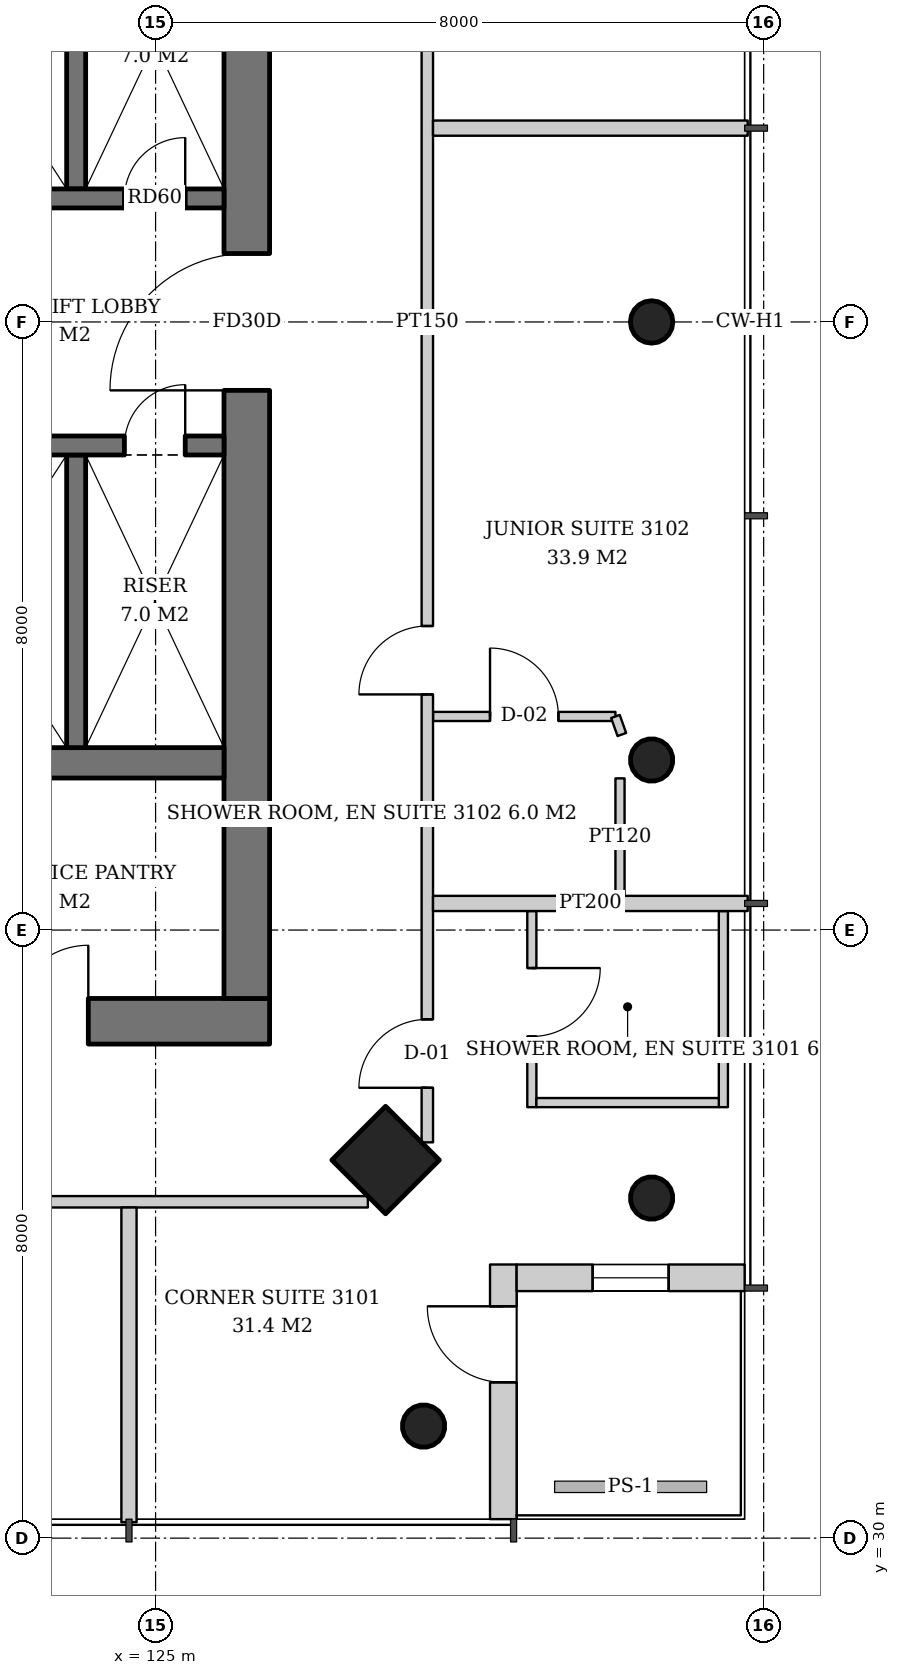
"""IFC4 building model, lengths in metres.
Left out: names, types, materials, properties, quantities, classifications, styles, units other than length and angle.
Written with IfcOpenShell. Run it as: python <this file> out.ifc"""

import sys

from ifc_helpers import new_model, si_unit, direction, frame, frame_2d, origin, origin_2d, place, context, subcontext, project, spatial, rectangle, hollow_circle, extrude, element, fill, save


model = new_model("IFC4")
c1 = context("Model", 3, precision=1e-05, world=origin(), true_north=direction((0.0, 1.0)))
c2 = subcontext(c1, "Body", "Model", "MODEL_VIEW")
j1 = project(units=[si_unit("LENGTHUNIT", "METRE"), si_unit("PLANEANGLEUNIT", "RADIAN")], contexts=[c1])
p1 = place(None, origin())
s1 = spatial("IfcSite", under=j1, at=p1, CompositionType="ELEMENT")
p2 = place(p1, origin())
s2 = spatial("IfcBuilding", under=s1, at=p2, CompositionType="ELEMENT")
p3 = place(p2, frame((0.0, 0.0, 123.6)))
s3 = spatial("IfcBuildingStorey", under=s2, at=p3, CompositionType="ELEMENT", Elevation=123.6)
p4 = place(p3, frame((131.578, 34.422, 0.0), z_axis=(-0.043032401563, 0.043032401563, 0.998146494675), x_axis=(-0.707106781187, -0.707106781187, 0.0)))
e1 = element("IfcColumn", 1, at=p4, inside=s3, PredefinedType="COLUMN", context=c2, shape_type="SweptSolid", body=[
    extrude(hollow_circle(Radius=0.28, WallThickness=0.02, at=origin_2d()), origin(), (0.0, 0.0, 1.0), 3.807),
])
p5 = place(p3, frame((131.578, 40.211, 0.0), z_axis=(-0.043062285527, 0.021563230905, 0.998839660125), x_axis=(-0.44774654769, -0.894160516368, 0.0)))
e2 = element("IfcColumn", 2, at=p5, inside=s3, PredefinedType="COLUMN", context=c2, shape_type="SweptSolid", body=[
    extrude(hollow_circle(Radius=0.28, WallThickness=0.02, at=origin_2d()), origin(), (0.0, 0.0, 1.0), 3.804),
])
p6 = place(p3, frame((131.578, 46.0, 0.0), z_axis=(-0.043072300418, 0.0, 0.999071957837), x_axis=(0.0, -1.0, 0.0)))
e3 = element("IfcColumn", 3, at=p6, inside=s3, PredefinedType="COLUMN", context=c2, shape_type="SweptSolid", body=[
    extrude(hollow_circle(Radius=0.28, WallThickness=0.02, at=origin_2d()), origin(), (0.0, 0.0, 1.0), 3.803),
])
p7 = place(p3, frame((128.078, 34.922, 0.0), z_axis=(-0.043032401563, 0.043032401563, 0.998146494675), x_axis=(-0.707106781187, -0.707106781187, 0.0)))
e4 = element("IfcColumn", 4, at=p7, inside=s3, PredefinedType="COLUMN", context=c2, shape_type="SweptSolid", body=[
    extrude(rectangle(XDim=1.0, YDim=1.0, at=origin_2d()), origin(), (0.0, 0.0, 1.0), 3.807),
])
p8 = place(p3, frame((128.578, 31.422, 0.0), z_axis=(-0.043032401563, 0.043032401563, 0.998146494675), x_axis=(-0.707106781187, -0.707106781187, 0.0)))
e5 = element("IfcColumn", 5, at=p8, inside=s3, PredefinedType="COLUMN", context=c2, shape_type="SweptSolid", body=[
    extrude(hollow_circle(Radius=0.28, WallThickness=0.02, at=origin_2d()), origin(), (0.0, 0.0, 1.0), 3.807),
])
p9 = place(p3, frame((107.5, 36.8, 0.0), z_axis=(0.0, 0.0, 1.0), x_axis=(1.0, 0.0, 0.0)))
e6 = element("IfcWall", 6, at=p9, inside=s3, PredefinedType="SHEAR", context=c2, shape_type="SweptSolid", body=[
    extrude(rectangle(XDim=19.0, YDim=0.6, at=frame_2d((9.5, 0.0))), origin(), (0.0, 0.0, 1.0), 3.8),
])
p10 = place(p9, frame((3.9, 0.0, 0.0)))
e7 = element("IfcOpeningElement", 7, at=p10, cuts=e6, PredefinedType="OPENING", context=c2, shape_type="SweptSolid", body=[
    extrude(rectangle(XDim=1.0, YDim=2.1, at=frame_2d((0.5, 1.05))), frame((0.0, 0.31, 0.0), z_axis=(0.0, -1.0, 0.0), x_axis=(1.0, 0.0, 0.0)), (0.0, 0.0, 1.0), 0.62),
])
p11 = place(p9, frame((15.615, 0.0, 0.0)))
e8 = element("IfcOpeningElement", 8, at=p11, cuts=e6, PredefinedType="OPENING", context=c2, shape_type="SweptSolid", body=[
    extrude(rectangle(XDim=1.0, YDim=2.1, at=frame_2d((0.5, 1.05))), frame((0.0, 0.31, 0.0), z_axis=(0.0, -1.0, 0.0), x_axis=(1.0, 0.0, 0.0)), (0.0, 0.0, 1.0), 0.62),
])
p12 = place(p3, frame((126.2, 37.1, 0.0), z_axis=(0.0, 0.0, 1.0), x_axis=(0.0, 1.0, 0.0)))
e9 = element("IfcWall", 9, at=p12, inside=s3, PredefinedType="SHEAR", context=c2, shape_type="SweptSolid", body=[
    extrude(rectangle(XDim=17.8, YDim=0.6, at=frame_2d((8.9, 0.0))), origin(), (0.0, 0.0, 1.0), 3.8),
])
p13 = place(p12, frame((8.0, 0.0, 0.0)))
e10 = element("IfcOpeningElement", 10, at=p13, cuts=e9, PredefinedType="OPENING", context=c2, shape_type="SweptSolid", body=[
    extrude(rectangle(XDim=1.8, YDim=2.4, at=frame_2d((0.9, 1.2))), frame((0.0, 0.31, 0.0), z_axis=(0.0, -1.0, 0.0), x_axis=(1.0, 0.0, 0.0)), (0.0, 0.0, 1.0), 0.62),
])
p14 = place(p3, frame((108.1, 40.2, 0.0), z_axis=(0.0, 0.0, 1.0), x_axis=(1.0, 0.0, 0.0)))
e11 = element("IfcWall", 11, at=p14, inside=s3, PredefinedType="SHEAR", context=c2, shape_type="SweptSolid", body=[
    extrude(rectangle(XDim=17.8, YDim=0.4, at=frame_2d((8.9, 0.0))), origin(), (0.0, 0.0, 1.0), 3.8),
])
p15 = place(p3, frame((129.575, 30.25, 0.0), z_axis=(0.0, 0.0, 1.0), x_axis=(0.0, 1.0, 0.0)))
e12 = element("IfcWall", 12, at=p15, inside=s3, PredefinedType="SOLIDWALL", context=c2, shape_type="SweptSolid", body=[
    extrude(rectangle(XDim=3.35, YDim=0.35, at=frame_2d((1.675, 0.0))), origin(), (0.0, 0.0, 1.0), 3.6),
])
p16 = place(p15, frame((1.8, 0.0, 0.0)))
e13 = element("IfcOpeningElement", 13, at=p16, cuts=e12, PredefinedType="OPENING", context=c2, shape_type="SweptSolid", body=[
    extrude(rectangle(XDim=1.0, YDim=2.4, at=frame_2d((0.5, 1.2))), frame((0.0, 0.185, 0.0), z_axis=(0.0, -1.0, 0.0), x_axis=(1.0, 0.0, 0.0)), (0.0, 0.0, 1.0), 0.37),
])
p17 = place(p3, frame((129.75, 33.425, 0.0), z_axis=(0.0, 0.0, 1.0), x_axis=(1.0, 0.0, 0.0)))
e14 = element("IfcWall", 14, at=p17, inside=s3, PredefinedType="SOLIDWALL", context=c2, shape_type="SweptSolid", body=[
    extrude(rectangle(XDim=3.0, YDim=0.35, at=frame_2d((1.5, 0.0))), origin(), (0.0, 0.0, 1.0), 3.6),
])
p18 = place(p17, frame((1.0, 0.0, 0.9)))
e15 = element("IfcOpeningElement", 15, at=p18, cuts=e14, PredefinedType="OPENING", context=c2, shape_type="SweptSolid", body=[
    extrude(rectangle(XDim=1.0, YDim=2.4, at=frame_2d((0.5, 1.2))), frame((0.0, 0.185, 0.0), z_axis=(0.0, -1.0, 0.0), x_axis=(1.0, 0.0, 0.0)), (0.0, 0.0, 1.0), 0.37),
])
p19 = place(p3, frame((123.955, 47.75, 0.0), z_axis=(0.0, 0.0, 1.0), x_axis=(0.0, 1.0, 0.0)))
e16 = element("IfcWall", 16, at=p19, inside=s3, PredefinedType="SHEAR", context=c2, shape_type="SweptSolid", body=[
    extrude(rectangle(XDim=3.85, YDim=0.25, at=frame_2d((1.925, 0.0))), origin(), (0.0, 0.0, 1.0), 3.8),
])
p20 = place(p3, frame((121.33, 47.625, 0.0), z_axis=(0.0, 0.0, 1.0), x_axis=(1.0, 0.0, 0.0)))
e17 = element("IfcWall", 17, at=p20, inside=s3, PredefinedType="SHEAR", context=c2, shape_type="SweptSolid", body=[
    extrude(rectangle(XDim=4.57, YDim=0.25, at=frame_2d((2.285, 0.0))), origin(), (0.0, 0.0, 1.0), 3.8),
])
p21 = place(p20, frame((0.55, 0.0, 0.0)))
e18 = element("IfcOpeningElement", 18, at=p21, cuts=e17, PredefinedType="OPENING", context=c2, shape_type="SweptSolid", body=[
    extrude(rectangle(XDim=1.4, YDim=2.4, at=frame_2d((0.7, 1.2))), frame((0.0, 0.135, 0.0), z_axis=(0.0, -1.0, 0.0), x_axis=(1.0, 0.0, 0.0)), (0.0, 0.0, 1.0), 0.27),
])
p22 = place(p20, frame((3.26, 0.0, 0.0)))
e19 = element("IfcOpeningElement", 19, at=p22, cuts=e17, PredefinedType="OPENING", context=c2, shape_type="SweptSolid", body=[
    extrude(rectangle(XDim=0.8, YDim=2.0, at=frame_2d((0.4, 1.0))), frame((0.0, 0.135, 0.0), z_axis=(0.0, -1.0, 0.0), x_axis=(1.0, 0.0, 0.0)), (0.0, 0.0, 1.0), 0.27),
])
p23 = place(p3, frame((123.955, 44.25, 0.0), z_axis=(0.0, 0.0, 1.0), x_axis=(0.0, -1.0, 0.0)))
e20 = element("IfcWall", 20, at=p23, inside=s3, PredefinedType="SHEAR", context=c2, shape_type="SweptSolid", body=[
    extrude(rectangle(XDim=3.85, YDim=0.25, at=frame_2d((1.925, 0.0))), origin(), (0.0, 0.0, 1.0), 3.8),
])
p24 = place(p3, frame((121.33, 44.375, 0.0), z_axis=(0.0, 0.0, 1.0), x_axis=(1.0, 0.0, 0.0)))
e21 = element("IfcWall", 21, at=p24, inside=s3, PredefinedType="SHEAR", context=c2, shape_type="SweptSolid", body=[
    extrude(rectangle(XDim=4.57, YDim=0.25, at=frame_2d((2.285, 0.0))), origin(), (0.0, 0.0, 1.0), 3.8),
])
p25 = place(p24, frame((0.55, 0.0, 0.0)))
e22 = element("IfcOpeningElement", 22, at=p25, cuts=e21, PredefinedType="OPENING", context=c2, shape_type="SweptSolid", body=[
    extrude(rectangle(XDim=1.4, YDim=2.4, at=frame_2d((0.7, 1.2))), frame((0.0, 0.135, 0.0), z_axis=(0.0, -1.0, 0.0), x_axis=(1.0, 0.0, 0.0)), (0.0, 0.0, 1.0), 0.27),
])
p26 = place(p24, frame((3.26, 0.0, 0.0)))
e23 = element("IfcOpeningElement", 23, at=p26, cuts=e21, PredefinedType="OPENING", context=c2, shape_type="SweptSolid", body=[
    extrude(rectangle(XDim=0.8, YDim=2.0, at=frame_2d((0.4, 1.0))), frame((0.0, 0.135, 0.0), z_axis=(0.0, -1.0, 0.0), x_axis=(1.0, 0.0, 0.0)), (0.0, 0.0, 1.0), 0.27),
])
p27 = place(p3, frame((129.95, 38.25, 0.0), z_axis=(0.0, 0.0, 1.0), x_axis=(0.0, -1.0, 0.0)))
e24 = element("IfcWall", 24, at=p27, inside=s3, PredefinedType="PARTITIONING", context=c2, shape_type="SweptSolid", body=[
    extrude(rectangle(XDim=2.58, YDim=0.12, at=frame_2d((1.29, 0.0))), origin(), (0.0, 0.0, 1.0), 2.9),
])
p28 = place(p27, frame((0.75, 0.0, 0.0)))
e25 = element("IfcOpeningElement", 25, at=p28, cuts=e24, PredefinedType="OPENING", context=c2, shape_type="SweptSolid", body=[
    extrude(rectangle(XDim=0.9, YDim=2.1, at=frame_2d((0.45, 1.05))), frame((0.0, 0.07, 0.0), z_axis=(0.0, -1.0, 0.0), x_axis=(1.0, 0.0, 0.0)), (0.0, 0.0, 1.0), 0.14),
])
p29 = place(p3, frame((132.47, 38.25, 0.0), z_axis=(0.0, 0.0, 1.0), x_axis=(0.0, -1.0, 0.0)))
e26 = element("IfcWall", 26, at=p29, inside=s3, PredefinedType="PARTITIONING", context=c2, shape_type="SweptSolid", body=[
    extrude(rectangle(XDim=2.58, YDim=0.12, at=frame_2d((1.29, 0.0))), origin(), (0.0, 0.0, 1.0), 3.6),
])
p30 = place(p3, frame((130.01, 35.73, 0.0), z_axis=(0.0, 0.0, 1.0), x_axis=(1.0, 0.0, 0.0)))
e27 = element("IfcWall", 27, at=p30, inside=s3, PredefinedType="PARTITIONING", context=c2, shape_type="SweptSolid", body=[
    extrude(rectangle(XDim=2.4, YDim=0.12, at=frame_2d((1.2, 0.0))), origin(), (0.0, 0.0, 1.0), 3.2),
])
p31 = place(p3, frame((131.11, 38.45, 0.0), z_axis=(0.0, 0.0, 1.0), x_axis=(0.0, 1.0, 0.0)))
e28 = element("IfcWall", 28, at=p31, inside=s3, PredefinedType="PARTITIONING", context=c2, shape_type="SweptSolid", body=[
    extrude(rectangle(XDim=1.546, YDim=0.12, at=frame_2d((0.773, 0.0))), origin(), (0.0, 0.0, 1.0), 3.6),
])
p32 = place(p3, frame((128.65, 40.81, 0.0), z_axis=(0.0, 0.0, 1.0), x_axis=(1.0, 0.0, 0.0)))
e29 = element("IfcWall", 29, at=p32, inside=s3, PredefinedType="PARTITIONING", context=c2, shape_type="SweptSolid", body=[
    extrude(rectangle(XDim=2.4, YDim=0.12, at=frame_2d((1.2, 0.0))), origin(), (0.0, 0.0, 1.0), 3.0),
])
p33 = place(p32, frame((0.75, 0.0, 0.0)))
e30 = element("IfcOpeningElement", 30, at=p33, cuts=e29, PredefinedType="OPENING", context=c2, shape_type="SweptSolid", body=[
    extrude(rectangle(XDim=0.9, YDim=2.1, at=frame_2d((0.45, 1.05))), frame((0.0, 0.07, 0.0), z_axis=(0.0, -1.0, 0.0), x_axis=(1.0, 0.0, 0.0)), (0.0, 0.0, 1.0), 0.14),
])
p34 = place(p3, frame((128.575, 35.207, 0.0), z_axis=(0.0, 0.0, 1.0), x_axis=(0.0, 1.0, 0.0)))
e31 = element("IfcWall", 31, at=p34, inside=s3, PredefinedType="PARTITIONING", context=c2, shape_type="SweptSolid", body=[
    extrude(rectangle(XDim=21.586, YDim=0.15, at=frame_2d((10.793, 0.0))), origin(), (0.0, 0.0, 1.0), 2.9),
])
p35 = place(p34, frame((0.718, 0.0, 0.0)))
e32 = element("IfcOpeningElement", 32, at=p35, cuts=e31, PredefinedType="OPENING", context=c2, shape_type="SweptSolid", body=[
    extrude(rectangle(XDim=0.9, YDim=2.1, at=frame_2d((0.45, 1.05))), frame((0.0, 0.085, 0.0), z_axis=(0.0, -1.0, 0.0), x_axis=(1.0, 0.0, 0.0)), (0.0, 0.0, 1.0), 0.17),
])
p36 = place(p34, frame((5.893, 0.0, 0.0)))
e33 = element("IfcOpeningElement", 33, at=p36, cuts=e31, PredefinedType="OPENING", context=c2, shape_type="SweptSolid", body=[
    extrude(rectangle(XDim=0.9, YDim=2.1, at=frame_2d((0.45, 1.05))), frame((0.0, 0.085, 0.0), z_axis=(0.0, -1.0, 0.0), x_axis=(1.0, 0.0, 0.0)), (0.0, 0.0, 1.0), 0.17),
])
p37 = place(p34, frame((16.043, 0.0, 0.0)))
e34 = element("IfcOpeningElement", 34, at=p37, cuts=e31, PredefinedType="OPENING", context=c2, shape_type="SweptSolid", body=[
    extrude(rectangle(XDim=1.0, YDim=2.1, at=frame_2d((0.5, 1.05))), frame((0.0, 0.085, 0.0), z_axis=(0.0, -1.0, 0.0), x_axis=(1.0, 0.0, 0.0)), (0.0, 0.0, 1.0), 0.17),
])
p38 = place(p3, frame((128.65, 38.35, 0.0), z_axis=(0.0, 0.0, 1.0), x_axis=(1.0, 0.0, 0.0)))
e35 = element("IfcWall", 35, at=p38, inside=s3, PredefinedType="PARTITIONING", context=c2, shape_type="SweptSolid", body=[
    extrude(rectangle(XDim=4.14, YDim=0.2, at=frame_2d((2.07, 0.0))), origin(), (0.0, 0.0, 1.0), 3.2),
])
p39 = place(p3, frame((128.65, 48.55, 0.0), z_axis=(0.0, 0.0, 1.0), x_axis=(1.0, 0.0, 0.0)))
e36 = element("IfcWall", 36, at=p39, inside=s3, PredefinedType="PARTITIONING", context=c2, shape_type="SweptSolid", body=[
    extrude(rectangle(XDim=4.14, YDim=0.2, at=frame_2d((2.07, 0.0))), origin(), (0.0, 0.0, 1.0), 3.0),
])
p40 = place(p3, frame((106.207, 34.425, 0.0), z_axis=(0.0, 0.0, 1.0), x_axis=(1.0, 0.0, 0.0)))
e37 = element("IfcWall", 37, at=p40, inside=s3, PredefinedType="PARTITIONING", context=c2, shape_type="SweptSolid", body=[
    extrude(rectangle(XDim=21.586, YDim=0.15, at=frame_2d((10.793, 0.0))), origin(), (0.0, 0.0, 1.0), 2.9),
])
p41 = place(p40, frame((0.718, 0.0, 0.0)))
e38 = element("IfcOpeningElement", 38, at=p41, cuts=e37, PredefinedType="OPENING", context=c2, shape_type="SweptSolid", body=[
    extrude(rectangle(XDim=0.9, YDim=2.1, at=frame_2d((0.45, 1.05))), frame((0.0, 0.085, 0.0), z_axis=(0.0, -1.0, 0.0), x_axis=(1.0, 0.0, 0.0)), (0.0, 0.0, 1.0), 0.17),
])
p42 = place(p40, frame((5.893, 0.0, 0.0)))
e39 = element("IfcOpeningElement", 39, at=p42, cuts=e37, PredefinedType="OPENING", context=c2, shape_type="SweptSolid", body=[
    extrude(rectangle(XDim=0.9, YDim=2.1, at=frame_2d((0.45, 1.05))), frame((0.0, 0.085, 0.0), z_axis=(0.0, -1.0, 0.0), x_axis=(1.0, 0.0, 0.0)), (0.0, 0.0, 1.0), 0.17),
])
p43 = place(p40, frame((16.043, 0.0, 0.0)))
e40 = element("IfcOpeningElement", 40, at=p43, cuts=e37, PredefinedType="OPENING", context=c2, shape_type="SweptSolid", body=[
    extrude(rectangle(XDim=1.0, YDim=2.1, at=frame_2d((0.5, 1.05))), frame((0.0, 0.085, 0.0), z_axis=(0.0, -1.0, 0.0), x_axis=(1.0, 0.0, 0.0)), (0.0, 0.0, 1.0), 0.17),
])
p44 = place(p3, frame((124.65, 34.35, 0.0), z_axis=(0.0, 0.0, 1.0), x_axis=(0.0, -1.0, 0.0)))
e41 = element("IfcWall", 41, at=p44, inside=s3, PredefinedType="PARTITIONING", context=c2, shape_type="SweptSolid", body=[
    extrude(rectangle(XDim=4.14, YDim=0.2, at=frame_2d((2.07, 0.0))), origin(), (0.0, 0.0, 1.0), 3.2),
])
p45 = place(p3, frame((131.05, 40.81, 0.0), z_axis=(0.0, 0.0, 1.0), x_axis=(0.33418781393, -0.942506501315, 0.0)))
e42 = element("IfcWall", 42, at=p45, inside=s3, PredefinedType="PARTITIONING", context=c2, shape_type="SweptSolid", body=[
    extrude(rectangle(XDim=0.252, YDim=0.12, at=frame_2d((0.126, 0.0))), origin(), (0.0, 0.0, 1.0), 3.0),
])
p46 = place(p16, origin())
e43 = element("IfcDoor", 43, at=p46, inside=s3, OperationType="SINGLE_SWING_RIGHT", PredefinedType="DOOR", context=c2, shape_type="SweptSolid", body=[
    extrude(rectangle(XDim=1.0, YDim=2.4, at=frame_2d((0.5, 1.2))), frame((0.0, 0.025, 0.0), z_axis=(0.0, -1.0, 0.0), x_axis=(1.0, 0.0, 0.0)), (0.0, 0.0, 1.0), 0.05),
])
fill(e13, e43)
p47 = place(p18, origin())
e44 = element("IfcWindow", 44, at=p47, inside=s3, PartitioningType="SINGLE_PANEL", PredefinedType="WINDOW", context=c2, shape_type="SweptSolid", body=[
    extrude(rectangle(XDim=1.0, YDim=2.4, at=frame_2d((0.5, 1.2))), frame((0.0, 0.03, 0.0), z_axis=(0.0, -1.0, 0.0), x_axis=(1.0, 0.0, 0.0)), (0.0, 0.0, 1.0), 0.06),
])
fill(e15, e44)
p48 = place(p22, origin())
e45 = element("IfcDoor", 45, at=p48, inside=s3, OperationType="SINGLE_SWING_RIGHT", PredefinedType="DOOR", context=c2, shape_type="SweptSolid", body=[
    extrude(rectangle(XDim=0.8, YDim=2.0, at=frame_2d((0.4, 1.0))), frame((0.0, 0.025, 0.0), z_axis=(0.0, -1.0, 0.0), x_axis=(1.0, 0.0, 0.0)), (0.0, 0.0, 1.0), 0.05),
])
fill(e19, e45)
p49 = place(p26, origin())
e46 = element("IfcDoor", 46, at=p49, inside=s3, OperationType="SINGLE_SWING_RIGHT", PredefinedType="DOOR", context=c2, shape_type="SweptSolid", body=[
    extrude(rectangle(XDim=0.8, YDim=2.0, at=frame_2d((0.4, 1.0))), frame((0.0, 0.025, 0.0), z_axis=(0.0, -1.0, 0.0), x_axis=(1.0, 0.0, 0.0)), (0.0, 0.0, 1.0), 0.05),
])
fill(e23, e46)
p50 = place(p13, origin())
e47 = element("IfcDoor", 47, at=p50, inside=s3, OperationType="DOUBLE_DOOR_SINGLE_SWING", PredefinedType="DOOR", context=c2, shape_type="SweptSolid", body=[
    extrude(rectangle(XDim=1.8, YDim=2.4, at=frame_2d((0.9, 1.2))), frame((0.0, 0.025, 0.0), z_axis=(0.0, -1.0, 0.0), x_axis=(1.0, 0.0, 0.0)), (0.0, 0.0, 1.0), 0.05),
])
fill(e10, e47)
p51 = place(p11, origin())
e48 = element("IfcDoor", 48, at=p51, inside=s3, OperationType="SINGLE_SWING_RIGHT", PredefinedType="DOOR", context=c2, shape_type="SweptSolid", body=[
    extrude(rectangle(XDim=1.0, YDim=2.1, at=frame_2d((0.5, 1.05))), frame((0.0, 0.29, 0.0), z_axis=(0.0, -1.0, 0.0), x_axis=(1.0, 0.0, 0.0)), (0.0, 0.0, 1.0), 0.05),
])
fill(e8, e48)
p52 = place(p28, origin())
e49 = element("IfcDoor", 49, at=p52, inside=s3, OperationType="SINGLE_SWING_LEFT", PredefinedType="DOOR", context=c2, shape_type="SweptSolid", body=[
    extrude(rectangle(XDim=0.9, YDim=2.1, at=frame_2d((0.45, 1.05))), frame((0.0, 0.025, 0.0), z_axis=(0.0, -1.0, 0.0), x_axis=(1.0, 0.0, 0.0)), (0.0, 0.0, 1.0), 0.05),
])
fill(e25, e49)
p53 = place(p33, origin())
e50 = element("IfcDoor", 50, at=p53, inside=s3, OperationType="SINGLE_SWING_LEFT", PredefinedType="DOOR", context=c2, shape_type="SweptSolid", body=[
    extrude(rectangle(XDim=0.9, YDim=2.1, at=frame_2d((0.45, 1.05))), frame((0.0, 0.025, 0.0), z_axis=(0.0, -1.0, 0.0), x_axis=(1.0, 0.0, 0.0)), (0.0, 0.0, 1.0), 0.05),
])
fill(e30, e50)
p54 = place(p35, origin())
e51 = element("IfcDoor", 51, at=p54, inside=s3, OperationType="SINGLE_SWING_LEFT", PredefinedType="DOOR", context=c2, shape_type="SweptSolid", body=[
    extrude(rectangle(XDim=0.9, YDim=2.1, at=frame_2d((0.45, 1.05))), frame((0.0, 0.025, 0.0), z_axis=(0.0, -1.0, 0.0), x_axis=(1.0, 0.0, 0.0)), (0.0, 0.0, 1.0), 0.05),
])
fill(e32, e51)
p55 = place(p36, origin())
e52 = element("IfcDoor", 52, at=p55, inside=s3, OperationType="SINGLE_SWING_LEFT", PredefinedType="DOOR", context=c2, shape_type="SweptSolid", body=[
    extrude(rectangle(XDim=0.9, YDim=2.1, at=frame_2d((0.45, 1.05))), frame((0.0, 0.025, 0.0), z_axis=(0.0, -1.0, 0.0), x_axis=(1.0, 0.0, 0.0)), (0.0, 0.0, 1.0), 0.05),
])
fill(e33, e52)
save(model, sys.argv[1])
